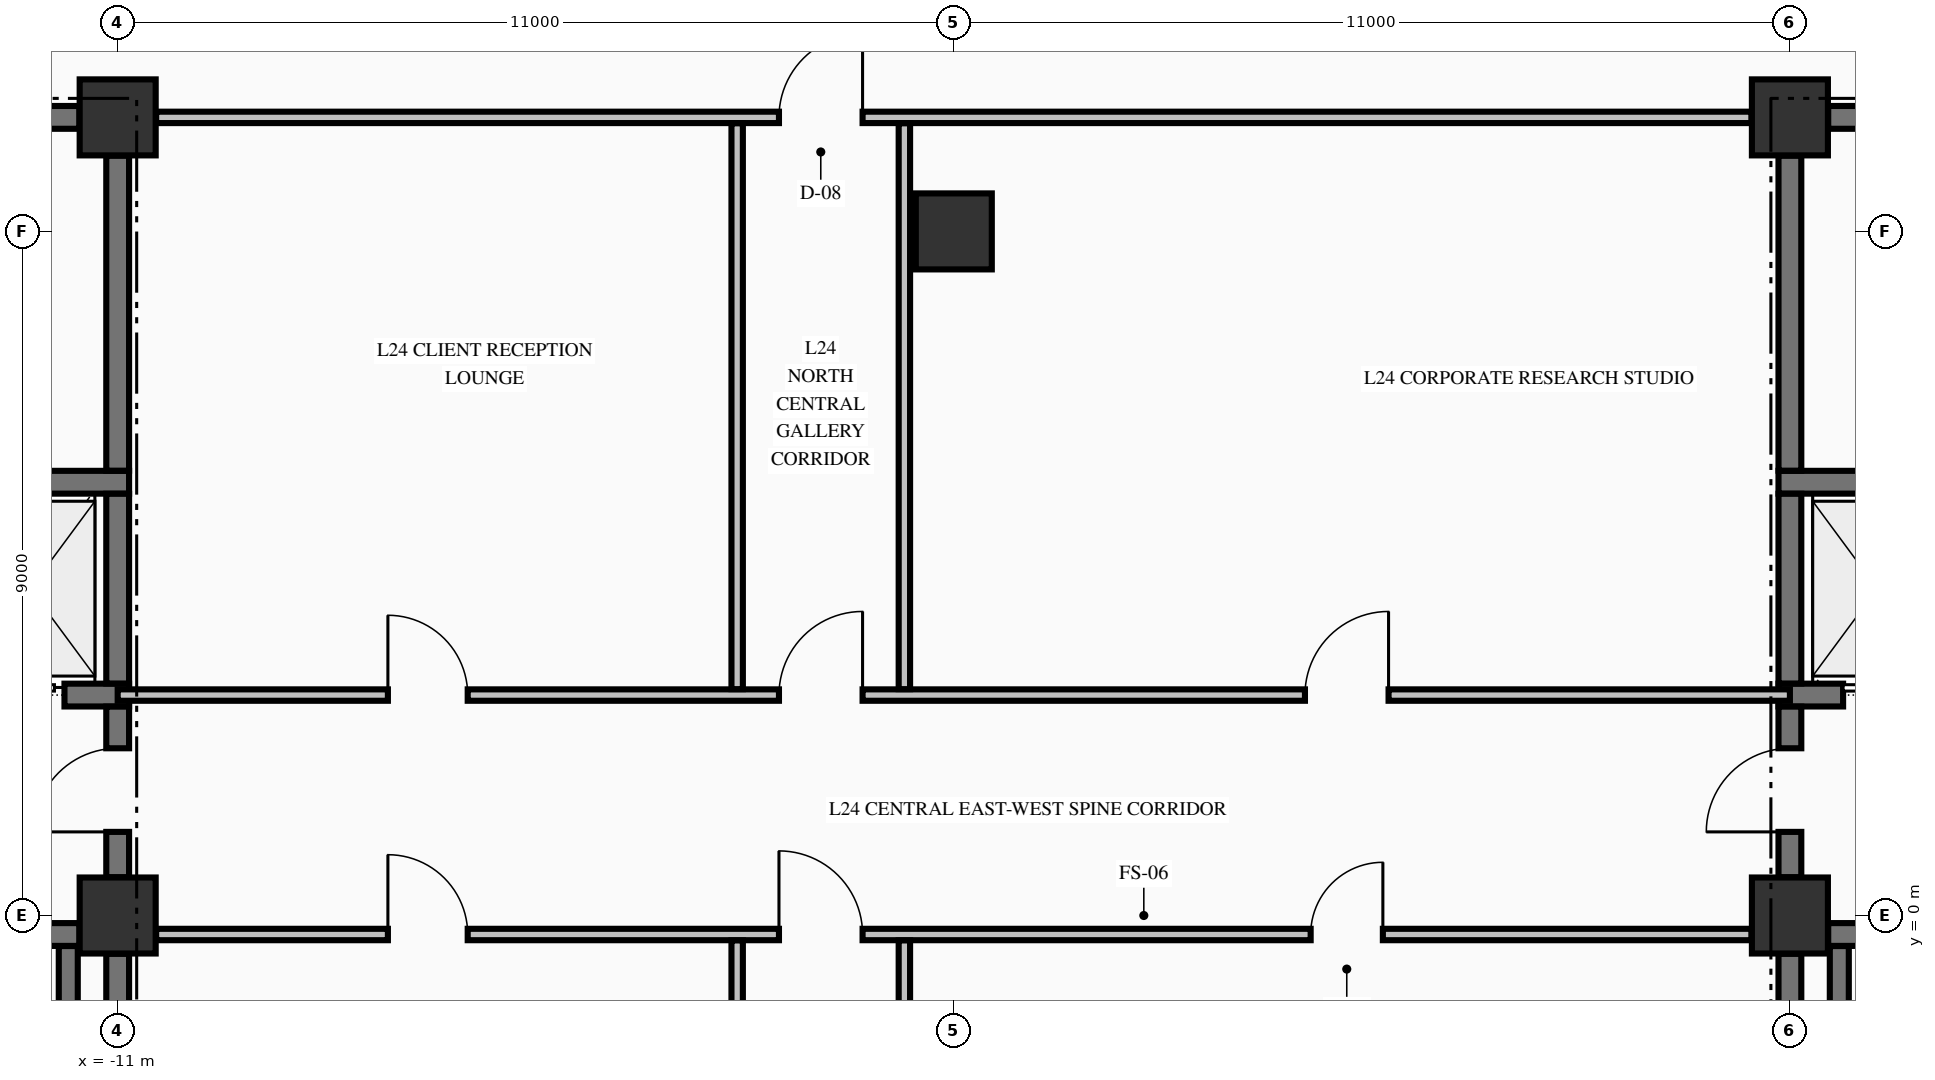
"""IFC4 building model, lengths in metres.
Left out: names, types, materials, properties, quantities, classifications, styles, units other than length and angle.
Written with IfcOpenShell. Run it as: python <this file> out.ifc"""

import sys

from ifc_helpers import new_model, si_unit, direction, frame, frame_2d, origin, origin_2d, place, context, subcontext, project, spatial, rectangle, extrude, element, fill, save


model = new_model("IFC4")
c1 = context("Model", 3, precision=1e-05, world=origin(), true_north=direction((0.0, 1.0)))
c2 = subcontext(c1, "Body", "Model", "MODEL_VIEW")
j1 = project(units=[si_unit("LENGTHUNIT", "METRE"), si_unit("PLANEANGLEUNIT", "RADIAN")], contexts=[c1])
p1 = place(None, origin())
s1 = spatial("IfcSite", under=j1, at=p1, CompositionType="ELEMENT")
p2 = place(p1, origin())
s2 = spatial("IfcBuilding", under=s1, at=p2, CompositionType="ELEMENT")
p3 = place(p2, frame((0.0, 0.0, 98.5)))
s3 = spatial("IfcBuildingStorey", under=s2, at=p3, CompositionType="ELEMENT", Elevation=98.5)
for number, where, z_axis, x_axis in (
    (1, (-11.0, 0.0, -0.275), (0.0, 0.0, 1.0), (1.0, 0.0, 0.0)),
    (2, (-11.0, 10.5, -0.275), (0.0, 0.0, 1.0), (1.0, 0.0, 0.0)),
    (3, (11.0, 0.0, -0.275), (0.0, 0.0, 1.0), (1.0, 0.0, 0.0)),
    (4, (11.0, 10.5, -0.275), (0.0, 0.0, 1.0), (1.0, 0.0, 0.0)),
    (5, (0.0, 9.0, -0.275), (0.0, 0.0, 1.0), (1.0, 0.0, 0.0)),
):
    element("IfcColumn", number, at=place(p3, frame(where, z_axis=z_axis, x_axis=x_axis)), inside=s3, PredefinedType="COLUMN", context=c2, shape_type="SweptSolid", body=[
        extrude(rectangle(XDim=1.0, YDim=1.0, at=origin_2d()), origin(), (0.0, 0.0, 1.0), 3.595),
    ])
p4 = place(p3, frame((-19.496, -0.25, 0.0), z_axis=(0.0, 0.0, 1.0), x_axis=(1.0, 0.0, 0.0)))
e6 = element("IfcWall", 6, at=p4, inside=s3, PredefinedType="SHEAR", context=c2, shape_type="SweptSolid", body=[
    extrude(rectangle(XDim=7.992, YDim=0.3, at=frame_2d((3.996, 0.0))), origin(), (0.0, 0.0, 1.0), 3.32),
])
p5 = place(p4, frame((5.796, 0.0, 0.0)))
e7 = element("IfcOpeningElement", 7, at=p5, cuts=e6, PredefinedType="OPENING", context=c2, shape_type="SweptSolid", body=[
    extrude(rectangle(XDim=1.1, YDim=2.15, at=frame_2d((0.55, 1.075))), frame((0.0, 0.16, 0.0), z_axis=(0.0, -1.0, 0.0), x_axis=(1.0, 0.0, 0.0)), (0.0, 0.0, 1.0), 0.32),
])
p6 = place(p3, frame((11.504, -0.25, 0.0), z_axis=(0.0, 0.0, 1.0), x_axis=(1.0, 0.0, 0.0)))
e8 = element("IfcWall", 8, at=p6, inside=s3, PredefinedType="SHEAR", context=c2, shape_type="SweptSolid", body=[
    extrude(rectangle(XDim=3.371, YDim=0.3, at=frame_2d((1.686, 0.0))), origin(), (0.0, 0.0, 1.0), 3.32),
])
p7 = place(p6, frame((1.096, 0.0, 0.0)))
e9 = element("IfcOpeningElement", 9, at=p7, cuts=e8, PredefinedType="OPENING", context=c2, shape_type="SweptSolid", body=[
    extrude(rectangle(XDim=1.1, YDim=2.15, at=frame_2d((0.55, 1.075))), frame((0.0, 0.16, 0.0), z_axis=(0.0, -1.0, 0.0), x_axis=(1.0, 0.0, 0.0)), (0.0, 0.0, 1.0), 0.32),
])
p8 = place(p3, frame((-14.875, 2.9, 0.0), z_axis=(0.0, 0.0, 1.0), x_axis=(1.0, 0.0, 0.0)))
e10 = element("IfcWall", 10, at=p8, inside=s3, PredefinedType="SHEAR", context=c2, shape_type="SweptSolid", body=[
    extrude(rectangle(XDim=4.025, YDim=0.3, at=frame_2d((2.012, 0.0))), origin(), (0.0, 0.0, 1.0), 3.32),
])
p9 = place(p8, frame((2.075, 0.0, 0.0)))
e11 = element("IfcOpeningElement", 11, at=p9, cuts=e10, PredefinedType="OPENING", context=c2, shape_type="SweptSolid", body=[
    extrude(rectangle(XDim=1.1, YDim=2.2, at=frame_2d((0.55, 1.1))), frame((0.0, 0.16, 0.0), z_axis=(0.0, -1.0, 0.0), x_axis=(1.0, 0.0, 0.0)), (0.0, 0.0, 1.0), 0.32),
])
p10 = place(p3, frame((10.85, 2.9, 0.0), z_axis=(0.0, 0.0, 1.0), x_axis=(1.0, 0.0, 0.0)))
e12 = element("IfcWall", 12, at=p10, inside=s3, PredefinedType="SHEAR", context=c2, shape_type="SweptSolid", body=[
    extrude(rectangle(XDim=4.025, YDim=0.3, at=frame_2d((2.012, 0.0))), origin(), (0.0, 0.0, 1.0), 3.32),
])
p11 = place(p10, frame((0.85, 0.0, 0.0)))
e13 = element("IfcOpeningElement", 13, at=p11, cuts=e12, PredefinedType="OPENING", context=c2, shape_type="SweptSolid", body=[
    extrude(rectangle(XDim=1.1, YDim=2.2, at=frame_2d((0.55, 1.1))), frame((0.0, 0.16, 0.0), z_axis=(0.0, -1.0, 0.0), x_axis=(1.0, 0.0, 0.0)), (0.0, 0.0, 1.0), 0.32),
])
for number, where, z_axis, x_axis in (
    (14, (-14.875, 5.7, 0.0), (0.0, 0.0, 1.0), (1.0, 0.0, 0.0)),
    (15, (10.85, 5.7, 0.0), (0.0, 0.0, 1.0), (1.0, 0.0, 0.0)),
):
    element("IfcWall", number, at=place(p3, frame(where, z_axis=z_axis, x_axis=x_axis)), inside=s3, PredefinedType="SHEAR", context=c2, shape_type="SweptSolid", body=[
        extrude(rectangle(XDim=4.025, YDim=0.3, at=frame_2d((2.012, 0.0))), origin(), (0.0, 0.0, 1.0), 3.32),
    ])
p12 = place(p3, frame((-14.7, 10.5, 0.0), z_axis=(0.0, 0.0, 1.0), x_axis=(1.0, 0.0, 0.0)))
e16 = element("IfcWall", 16, at=p12, inside=s3, PredefinedType="SHEAR", context=c2, shape_type="SweptSolid", body=[
    extrude(rectangle(XDim=3.196, YDim=0.3, at=frame_2d((1.598, 0.0))), origin(), (0.0, 0.0, 1.0), 3.32),
])
p13 = place(p12, frame((0.775, 0.0, 0.0)))
e17 = element("IfcOpeningElement", 17, at=p13, cuts=e16, PredefinedType="OPENING", context=c2, shape_type="SweptSolid", body=[
    extrude(rectangle(XDim=0.95, YDim=2.15, at=frame_2d((0.475, 1.075))), frame((0.0, 0.16, 0.0), z_axis=(0.0, -1.0, 0.0), x_axis=(1.0, 0.0, 0.0)), (0.0, 0.0, 1.0), 0.32),
])
p14 = place(p3, frame((11.504, 10.5, 0.0), z_axis=(0.0, 0.0, 1.0), x_axis=(1.0, 0.0, 0.0)))
e18 = element("IfcWall", 18, at=p14, inside=s3, PredefinedType="SHEAR", context=c2, shape_type="SweptSolid", body=[
    extrude(rectangle(XDim=3.196, YDim=0.3, at=frame_2d((1.598, 0.0))), origin(), (0.0, 0.0, 1.0), 3.32),
])
p15 = place(p14, frame((2.001, 0.0, 0.0)))
e19 = element("IfcOpeningElement", 19, at=p15, cuts=e18, PredefinedType="OPENING", context=c2, shape_type="SweptSolid", body=[
    extrude(rectangle(XDim=0.95, YDim=2.15, at=frame_2d((0.475, 1.075))), frame((0.0, 0.16, 0.0), z_axis=(0.0, -1.0, 0.0), x_axis=(1.0, 0.0, 0.0)), (0.0, 0.0, 1.0), 0.32),
])
p16 = place(p3, frame((-10.494, -0.25, 0.0), z_axis=(0.0, 0.0, 1.0), x_axis=(1.0, 0.0, 0.0)))
e20 = element("IfcWall", 20, at=p16, inside=s3, PredefinedType="PARTITIONING", context=c2, shape_type="SweptSolid", body=[
    extrude(rectangle(XDim=20.988, YDim=0.15, at=frame_2d((10.494, 0.0))), origin(), (0.0, 0.0, 1.0), 3.32),
])
p17 = place(p16, frame((8.194, 0.0, 0.0)))
e21 = element("IfcOpeningElement", 21, at=p17, cuts=e20, PredefinedType="OPENING", context=c2, shape_type="SweptSolid", body=[
    extrude(rectangle(XDim=1.1, YDim=2.15, at=frame_2d((0.55, 1.075))), frame((0.0, 0.085, 0.0), z_axis=(0.0, -1.0, 0.0), x_axis=(1.0, 0.0, 0.0)), (0.0, 0.0, 1.0), 0.17),
])
p18 = place(p16, frame((3.049, 0.0, 0.0)))
e22 = element("IfcOpeningElement", 22, at=p18, cuts=e20, PredefinedType="OPENING", context=c2, shape_type="SweptSolid", body=[
    extrude(rectangle(XDim=1.05, YDim=2.15, at=frame_2d((0.525, 1.075))), frame((0.0, 0.085, 0.0), z_axis=(0.0, -1.0, 0.0), x_axis=(1.0, 0.0, 0.0)), (0.0, 0.0, 1.0), 0.17),
])
p19 = place(p16, frame((15.189, 0.0, 0.0)))
e23 = element("IfcOpeningElement", 23, at=p19, cuts=e20, PredefinedType="OPENING", context=c2, shape_type="SweptSolid", body=[
    extrude(rectangle(XDim=0.95, YDim=2.15, at=frame_2d((0.475, 1.075))), frame((0.0, 0.085, 0.0), z_axis=(0.0, -1.0, 0.0), x_axis=(1.0, 0.0, 0.0)), (0.0, 0.0, 1.0), 0.17),
])
p20 = place(p3, frame((-11.0, 2.9, 0.0), z_axis=(0.0, 0.0, 1.0), x_axis=(1.0, 0.0, 0.0)))
e24 = element("IfcWall", 24, at=p20, inside=s3, PredefinedType="PARTITIONING", context=c2, shape_type="SweptSolid", body=[
    extrude(rectangle(XDim=22.0, YDim=0.15, at=frame_2d((11.0, 0.0))), origin(), (0.0, 0.0, 1.0), 3.32),
])
p21 = place(p20, frame((8.7, 0.0, 0.0)))
e25 = element("IfcOpeningElement", 25, at=p21, cuts=e24, PredefinedType="OPENING", context=c2, shape_type="SweptSolid", body=[
    extrude(rectangle(XDim=1.1, YDim=2.15, at=frame_2d((0.55, 1.075))), frame((0.0, 0.085, 0.0), z_axis=(0.0, -1.0, 0.0), x_axis=(1.0, 0.0, 0.0)), (0.0, 0.0, 1.0), 0.17),
])
p22 = place(p20, frame((3.555, 0.0, 0.0)))
e26 = element("IfcOpeningElement", 26, at=p22, cuts=e24, PredefinedType="OPENING", context=c2, shape_type="SweptSolid", body=[
    extrude(rectangle(XDim=1.05, YDim=2.15, at=frame_2d((0.525, 1.075))), frame((0.0, 0.085, 0.0), z_axis=(0.0, -1.0, 0.0), x_axis=(1.0, 0.0, 0.0)), (0.0, 0.0, 1.0), 0.17),
])
p23 = place(p20, frame((15.62, 0.0, 0.0)))
e27 = element("IfcOpeningElement", 27, at=p23, cuts=e24, PredefinedType="OPENING", context=c2, shape_type="SweptSolid", body=[
    extrude(rectangle(XDim=1.1, YDim=2.15, at=frame_2d((0.55, 1.075))), frame((0.0, 0.085, 0.0), z_axis=(0.0, -1.0, 0.0), x_axis=(1.0, 0.0, 0.0)), (0.0, 0.0, 1.0), 0.17),
])
p24 = place(p3, frame((-10.494, 10.5, 0.0), z_axis=(0.0, 0.0, 1.0), x_axis=(1.0, 0.0, 0.0)))
e28 = element("IfcWall", 28, at=p24, inside=s3, PredefinedType="PARTITIONING", context=c2, shape_type="SweptSolid", body=[
    extrude(rectangle(XDim=20.988, YDim=0.15, at=frame_2d((10.494, 0.0))), origin(), (0.0, 0.0, 1.0), 3.32),
])
p25 = place(p24, frame((8.194, 0.0, 0.0)))
e29 = element("IfcOpeningElement", 29, at=p25, cuts=e28, PredefinedType="OPENING", context=c2, shape_type="SweptSolid", body=[
    extrude(rectangle(XDim=1.1, YDim=2.15, at=frame_2d((0.55, 1.075))), frame((0.0, 0.085, 0.0), z_axis=(0.0, -1.0, 0.0), x_axis=(1.0, 0.0, 0.0)), (0.0, 0.0, 1.0), 0.17),
])
p26 = place(p3, frame((-11.65, -9.798, 0.0), z_axis=(0.0, 0.0, 1.0), x_axis=(0.0, 1.0, 0.0)))
e30 = element("IfcWall", 30, at=p26, inside=s3, PredefinedType="SOLIDWALL", context=c2, shape_type="SweptSolid", body=[
    extrude(rectangle(XDim=9.396, YDim=0.25, at=frame_2d((4.698, 0.0))), origin(), (0.0, 0.0, 1.0), 3.32),
])
p27 = place(p3, frame((-11.0, -9.446, 0.0), z_axis=(0.0, 0.0, 1.0), x_axis=(0.0, 1.0, 0.0)))
e31 = element("IfcWall", 31, at=p27, inside=s3, PredefinedType="SHEAR", context=c2, shape_type="SweptSolid", body=[
    extrude(rectangle(XDim=8.942, YDim=0.3, at=frame_2d((4.471, 0.0))), origin(), (0.0, 0.0, 1.0), 3.32),
])
p28 = place(p3, frame((-11.0, 0.504, 0.0), z_axis=(0.0, 0.0, 1.0), x_axis=(0.0, 1.0, 0.0)))
e32 = element("IfcWall", 32, at=p28, inside=s3, PredefinedType="SHEAR", context=c2, shape_type="SweptSolid", body=[
    extrude(rectangle(XDim=2.244, YDim=0.3, at=frame_2d((1.122, 0.0))), origin(), (0.0, 0.0, 1.0), 3.32),
])
p29 = place(p28, frame((0.596, 0.0, 0.0)))
e33 = element("IfcOpeningElement", 33, at=p29, cuts=e32, PredefinedType="OPENING", context=c2, shape_type="SweptSolid", body=[
    extrude(rectangle(XDim=1.1, YDim=2.15, at=frame_2d((0.55, 1.075))), frame((0.0, 0.16, 0.0), z_axis=(0.0, -1.0, 0.0), x_axis=(1.0, 0.0, 0.0)), (0.0, 0.0, 1.0), 0.32),
])
p30 = place(p3, frame((-11.0, 3.052, 0.0), z_axis=(0.0, 0.0, 1.0), x_axis=(0.0, 1.0, 0.0)))
e34 = element("IfcWall", 34, at=p30, inside=s3, PredefinedType="SHEAR", context=c2, shape_type="SweptSolid", body=[
    extrude(rectangle(XDim=2.496, YDim=0.3, at=frame_2d((1.248, 0.0))), origin(), (0.0, 0.0, 1.0), 3.32),
])
p31 = place(p3, frame((-11.0, 5.852, 0.0), z_axis=(0.0, 0.0, 1.0), x_axis=(0.0, 1.0, 0.0)))
e35 = element("IfcWall", 35, at=p31, inside=s3, PredefinedType="SHEAR", context=c2, shape_type="SweptSolid", body=[
    extrude(rectangle(XDim=4.144, YDim=0.3, at=frame_2d((2.072, 0.0))), origin(), (0.0, 0.0, 1.0), 3.32),
])
p32 = place(p3, frame((11.0, -9.446, 0.0), z_axis=(0.0, 0.0, 1.0), x_axis=(0.0, 1.0, 0.0)))
e36 = element("IfcWall", 36, at=p32, inside=s3, PredefinedType="SHEAR", context=c2, shape_type="SweptSolid", body=[
    extrude(rectangle(XDim=8.942, YDim=0.3, at=frame_2d((4.471, 0.0))), origin(), (0.0, 0.0, 1.0), 3.32),
])
p33 = place(p3, frame((11.0, 0.504, 0.0), z_axis=(0.0, 0.0, 1.0), x_axis=(0.0, 1.0, 0.0)))
e37 = element("IfcWall", 37, at=p33, inside=s3, PredefinedType="SHEAR", context=c2, shape_type="SweptSolid", body=[
    extrude(rectangle(XDim=2.244, YDim=0.3, at=frame_2d((1.122, 0.0))), origin(), (0.0, 0.0, 1.0), 3.32),
])
p34 = place(p33, frame((0.596, 0.0, 0.0)))
e38 = element("IfcOpeningElement", 38, at=p34, cuts=e37, PredefinedType="OPENING", context=c2, shape_type="SweptSolid", body=[
    extrude(rectangle(XDim=1.1, YDim=2.15, at=frame_2d((0.55, 1.075))), frame((0.0, 0.16, 0.0), z_axis=(0.0, -1.0, 0.0), x_axis=(1.0, 0.0, 0.0)), (0.0, 0.0, 1.0), 0.32),
])
p35 = place(p3, frame((11.0, 3.052, 0.0), z_axis=(0.0, 0.0, 1.0), x_axis=(0.0, 1.0, 0.0)))
e39 = element("IfcWall", 39, at=p35, inside=s3, PredefinedType="SHEAR", context=c2, shape_type="SweptSolid", body=[
    extrude(rectangle(XDim=2.496, YDim=0.3, at=frame_2d((1.248, 0.0))), origin(), (0.0, 0.0, 1.0), 3.32),
])
p36 = place(p3, frame((11.0, 5.852, 0.0), z_axis=(0.0, 0.0, 1.0), x_axis=(0.0, 1.0, 0.0)))
e40 = element("IfcWall", 40, at=p36, inside=s3, PredefinedType="SHEAR", context=c2, shape_type="SweptSolid", body=[
    extrude(rectangle(XDim=4.144, YDim=0.3, at=frame_2d((2.072, 0.0))), origin(), (0.0, 0.0, 1.0), 3.32),
])
p37 = place(p3, frame((11.65, -9.798, 0.0), z_axis=(0.0, 0.0, 1.0), x_axis=(0.0, 1.0, 0.0)))
e41 = element("IfcWall", 41, at=p37, inside=s3, PredefinedType="SOLIDWALL", context=c2, shape_type="SweptSolid", body=[
    extrude(rectangle(XDim=9.396, YDim=0.25, at=frame_2d((4.698, 0.0))), origin(), (0.0, 0.0, 1.0), 3.32),
])
p38 = place(p3, frame((-2.85, -9.872, 0.0), z_axis=(0.0, 0.0, 1.0), x_axis=(0.0, 1.0, 0.0)))
e42 = element("IfcWall", 42, at=p38, inside=s3, PredefinedType="PARTITIONING", context=c2, shape_type="SweptSolid", body=[
    extrude(rectangle(XDim=9.544, YDim=0.15, at=frame_2d((4.772, 0.0))), origin(), (0.0, 0.0, 1.0), 3.32),
])
p39 = place(p3, frame((-2.85, 2.978, 0.0), z_axis=(0.0, 0.0, 1.0), x_axis=(0.0, 1.0, 0.0)))
e43 = element("IfcWall", 43, at=p39, inside=s3, PredefinedType="PARTITIONING", context=c2, shape_type="SweptSolid", body=[
    extrude(rectangle(XDim=7.444, YDim=0.15, at=frame_2d((3.722, 0.0))), origin(), (0.0, 0.0, 1.0), 3.32),
])
p40 = place(p3, frame((-0.65, -5.247, 0.0), z_axis=(0.0, 0.0, 1.0), x_axis=(0.0, 1.0, 0.0)))
e44 = element("IfcWall", 44, at=p40, inside=s3, PredefinedType="PARTITIONING", context=c2, shape_type="SweptSolid", body=[
    extrude(rectangle(XDim=4.919, YDim=0.15, at=frame_2d((2.459, 0.0))), origin(), (0.0, 0.0, 1.0), 3.32),
])
p41 = place(p3, frame((-0.65, 2.978, 0.0), z_axis=(0.0, 0.0, 1.0), x_axis=(0.0, 1.0, 0.0)))
e45 = element("IfcWall", 45, at=p41, inside=s3, PredefinedType="PARTITIONING", context=c2, shape_type="SweptSolid", body=[
    extrude(rectangle(XDim=7.444, YDim=0.15, at=frame_2d((3.722, 0.0))), origin(), (0.0, 0.0, 1.0), 3.32),
])
p42 = place(p29, origin())
e46 = element("IfcDoor", 46, at=p42, inside=s3, OperationType="SINGLE_SWING_LEFT", PredefinedType="DOOR", context=c2, shape_type="SweptSolid", body=[
    extrude(rectangle(XDim=1.1, YDim=2.15, at=frame_2d((0.55, 1.075))), frame((0.0, 0.025, 0.0), z_axis=(0.0, -1.0, 0.0), x_axis=(1.0, 0.0, 0.0)), (0.0, 0.0, 1.0), 0.05),
])
fill(e33, e46)
p43 = place(p9, origin())
e47 = element("IfcDoor", 47, at=p43, inside=s3, OperationType="SLIDING_TO_LEFT", PredefinedType="DOOR", context=c2, shape_type="SweptSolid", body=[
    extrude(rectangle(XDim=1.1, YDim=2.2, at=frame_2d((0.55, 1.1))), frame((0.0, 0.025, 0.0), z_axis=(0.0, -1.0, 0.0), x_axis=(1.0, 0.0, 0.0)), (0.0, 0.0, 1.0), 0.05),
])
fill(e11, e47)
p44 = place(p34, origin())
e48 = element("IfcDoor", 48, at=p44, inside=s3, OperationType="SINGLE_SWING_LEFT", PredefinedType="DOOR", context=c2, shape_type="SweptSolid", body=[
    extrude(rectangle(XDim=1.1, YDim=2.15, at=frame_2d((0.55, 1.075))), frame((0.0, 0.025, 0.0), z_axis=(0.0, -1.0, 0.0), x_axis=(1.0, 0.0, 0.0)), (0.0, 0.0, 1.0), 0.05),
])
fill(e38, e48)
p45 = place(p11, origin())
e49 = element("IfcDoor", 49, at=p45, inside=s3, OperationType="SLIDING_TO_RIGHT", PredefinedType="DOOR", context=c2, shape_type="SweptSolid", body=[
    extrude(rectangle(XDim=1.1, YDim=2.2, at=frame_2d((0.55, 1.1))), frame((0.0, 0.025, 0.0), z_axis=(0.0, -1.0, 0.0), x_axis=(1.0, 0.0, 0.0)), (0.0, 0.0, 1.0), 0.05),
])
fill(e13, e49)
p46 = place(p25, origin())
e50 = element("IfcDoor", 50, at=p46, inside=s3, OperationType="SINGLE_SWING_RIGHT", PredefinedType="DOOR", context=c2, shape_type="SweptSolid", body=[
    extrude(rectangle(XDim=1.1, YDim=2.15, at=frame_2d((0.55, 1.075))), frame((0.0, 0.025, 0.0), z_axis=(0.0, -1.0, 0.0), x_axis=(1.0, 0.0, 0.0)), (0.0, 0.0, 1.0), 0.05),
])
fill(e29, e50)
p47 = place(p21, origin())
e51 = element("IfcDoor", 51, at=p47, inside=s3, OperationType="SINGLE_SWING_RIGHT", PredefinedType="DOOR", context=c2, shape_type="SweptSolid", body=[
    extrude(rectangle(XDim=1.1, YDim=2.15, at=frame_2d((0.55, 1.075))), frame((0.0, 0.025, 0.0), z_axis=(0.0, -1.0, 0.0), x_axis=(1.0, 0.0, 0.0)), (0.0, 0.0, 1.0), 0.05),
])
fill(e25, e51)
p48 = place(p17, origin())
e52 = element("IfcDoor", 52, at=p48, inside=s3, OperationType="SINGLE_SWING_LEFT", PredefinedType="DOOR", context=c2, shape_type="SweptSolid", body=[
    extrude(rectangle(XDim=1.1, YDim=2.15, at=frame_2d((0.55, 1.075))), frame((0.0, 0.025, 0.0), z_axis=(0.0, -1.0, 0.0), x_axis=(1.0, 0.0, 0.0)), (0.0, 0.0, 1.0), 0.05),
])
fill(e21, e52)
p49 = place(p22, origin())
e53 = element("IfcDoor", 53, at=p49, inside=s3, OperationType="SINGLE_SWING_LEFT", PredefinedType="DOOR", context=c2, shape_type="SweptSolid", body=[
    extrude(rectangle(XDim=1.05, YDim=2.15, at=frame_2d((0.525, 1.075))), frame((0.0, 0.025, 0.0), z_axis=(0.0, -1.0, 0.0), x_axis=(1.0, 0.0, 0.0)), (0.0, 0.0, 1.0), 0.05),
])
fill(e26, e53)
p50 = place(p23, origin())
e54 = element("IfcDoor", 54, at=p50, inside=s3, OperationType="SINGLE_SWING_RIGHT", PredefinedType="DOOR", context=c2, shape_type="SweptSolid", body=[
    extrude(rectangle(XDim=1.1, YDim=2.15, at=frame_2d((0.55, 1.075))), frame((0.0, 0.025, 0.0), z_axis=(0.0, -1.0, 0.0), x_axis=(1.0, 0.0, 0.0)), (0.0, 0.0, 1.0), 0.05),
])
fill(e27, e54)
p51 = place(p18, origin())
e55 = element("IfcDoor", 55, at=p51, inside=s3, OperationType="SINGLE_SWING_LEFT", PredefinedType="DOOR", context=c2, shape_type="SweptSolid", body=[
    extrude(rectangle(XDim=1.05, YDim=2.15, at=frame_2d((0.525, 1.075))), frame((0.0, 0.025, 0.0), z_axis=(0.0, -1.0, 0.0), x_axis=(1.0, 0.0, 0.0)), (0.0, 0.0, 1.0), 0.05),
])
fill(e22, e55)
p52 = place(p19, origin())
e56 = element("IfcDoor", 56, at=p52, inside=s3, OperationType="SINGLE_SWING_RIGHT", PredefinedType="DOOR", context=c2, shape_type="SweptSolid", body=[
    extrude(rectangle(XDim=0.95, YDim=2.15, at=frame_2d((0.475, 1.075))), frame((0.0, 0.025, 0.0), z_axis=(0.0, -1.0, 0.0), x_axis=(1.0, 0.0, 0.0)), (0.0, 0.0, 1.0), 0.05),
])
fill(e23, e56)
save(model, sys.argv[1])
